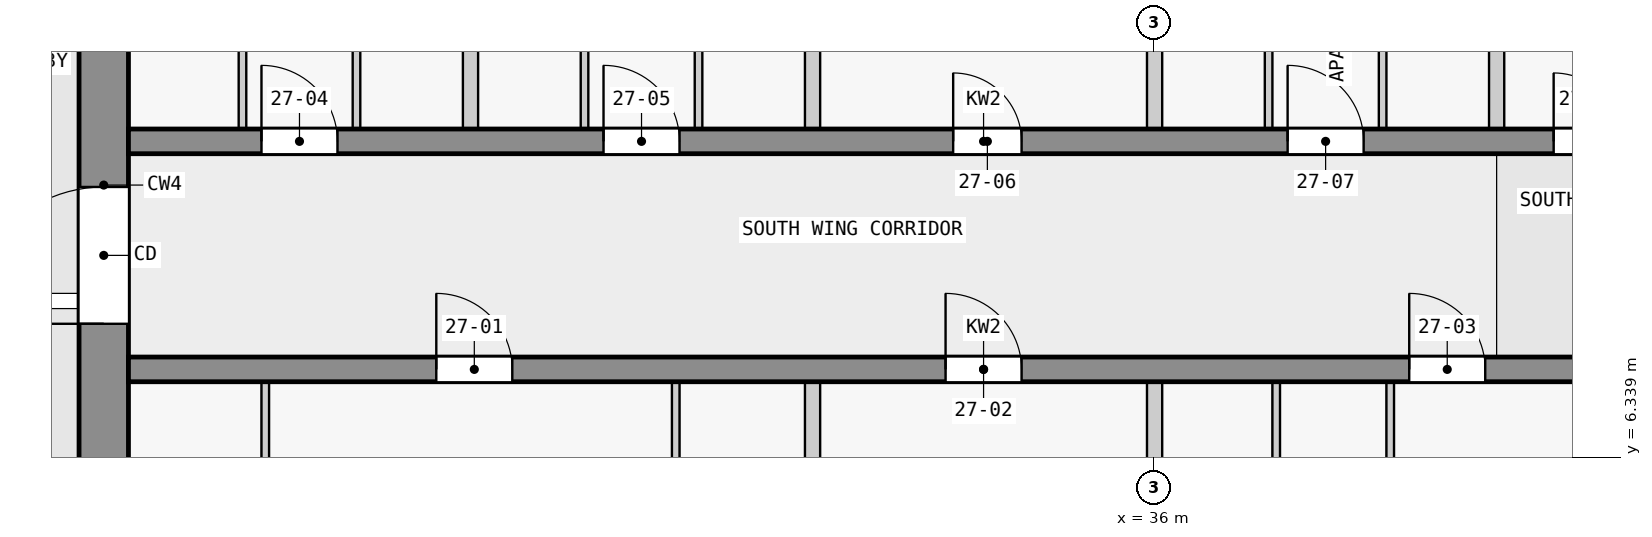
"""IFC4 building model, lengths in metres.
Left out: names, types, materials, properties, quantities, classifications, styles, units other than length and angle.
Written with IfcOpenShell. Run it as: python <this file> out.ifc"""

import sys

from ifc_helpers import new_model, si_unit, direction, frame, frame_2d, origin, place, context, subcontext, project, spatial, rectangle, extrude, element, fill, save


model = new_model("IFC4")
c1 = context("Model", 3, precision=1e-05, world=origin(), true_north=direction((0.0, 1.0)))
c2 = subcontext(c1, "Body", "Model", "MODEL_VIEW")
j1 = project(units=[si_unit("LENGTHUNIT", "METRE"), si_unit("PLANEANGLEUNIT", "RADIAN")], contexts=[c1])
p1 = place(None, origin())
s1 = spatial("IfcSite", under=j1, at=p1, CompositionType="ELEMENT")
p2 = place(p1, origin())
s2 = spatial("IfcBuilding", under=s1, at=p2, CompositionType="ELEMENT")
p3 = place(p2, frame((0.0, 0.0, 106.3)))
s3 = spatial("IfcBuildingStorey", under=s2, at=p3, CompositionType="ELEMENT", Elevation=106.3)
p4 = place(p3, frame((22.175, 2.5, 0.0), z_axis=(0.0, 0.0, 1.0), x_axis=(0.0, 1.0, 0.0)))
e1 = element("IfcWall", 1, at=p4, inside=s3, PredefinedType="SHEAR", context=c2, shape_type="SweptSolid", body=[
    extrude(rectangle(XDim=14.85, YDim=0.65, at=frame_2d((7.425, 0.0))), origin(), (0.0, 0.0, 1.0), 3.25),
])
p5 = place(p4, frame((5.6, 0.0, 0.0)))
e2 = element("IfcOpeningElement", 2, at=p5, cuts=e1, PredefinedType="OPENING", context=c2, shape_type="SweptSolid", body=[
    extrude(rectangle(XDim=1.8, YDim=2.1, at=frame_2d((0.9, 1.05))), frame((0.0, 0.335, 0.0), z_axis=(0.0, -1.0, 0.0), x_axis=(1.0, 0.0, 0.0)), (0.0, 0.0, 1.0), 0.67),
])
p6 = place(p3, frame((22.5, 7.5, 0.0), z_axis=(0.0, 0.0, 1.0), x_axis=(1.0, 0.0, 0.0)))
e3 = element("IfcWall", 3, at=p6, inside=s3, PredefinedType="SHEAR", context=c2, shape_type="SweptSolid", body=[
    extrude(rectangle(XDim=22.5, YDim=0.325, at=frame_2d((11.25, 0.0))), origin(), (0.0, 0.0, 1.0), 3.25),
])
p7 = place(p6, frame((4.05, 0.0, 0.0)))
e4 = element("IfcOpeningElement", 4, at=p7, cuts=e3, PredefinedType="OPENING", context=c2, shape_type="SweptSolid", body=[
    extrude(rectangle(XDim=1.0, YDim=2.1, at=frame_2d((0.5, 1.05))), frame((0.0, 0.172, 0.0), z_axis=(0.0, -1.0, 0.0), x_axis=(1.0, 0.0, 0.0)), (0.0, 0.0, 1.0), 0.345),
])
p8 = place(p6, frame((10.75, 0.0, 0.0)))
e5 = element("IfcOpeningElement", 5, at=p8, cuts=e3, PredefinedType="OPENING", context=c2, shape_type="SweptSolid", body=[
    extrude(rectangle(XDim=1.0, YDim=2.1, at=frame_2d((0.5, 1.05))), frame((0.0, 0.172, 0.0), z_axis=(0.0, -1.0, 0.0), x_axis=(1.0, 0.0, 0.0)), (0.0, 0.0, 1.0), 0.345),
])
p9 = place(p6, frame((16.85, 0.0, 0.0)))
e6 = element("IfcOpeningElement", 6, at=p9, cuts=e3, PredefinedType="OPENING", context=c2, shape_type="SweptSolid", body=[
    extrude(rectangle(XDim=1.0, YDim=2.1, at=frame_2d((0.5, 1.05))), frame((0.0, 0.172, 0.0), z_axis=(0.0, -1.0, 0.0), x_axis=(1.0, 0.0, 0.0)), (0.0, 0.0, 1.0), 0.345),
])
p10 = place(p3, frame((22.5, 10.5, 0.0), z_axis=(0.0, 0.0, 1.0), x_axis=(1.0, 0.0, 0.0)))
e7 = element("IfcWall", 7, at=p10, inside=s3, PredefinedType="SHEAR", context=c2, shape_type="SweptSolid", body=[
    extrude(rectangle(XDim=22.5, YDim=0.325, at=frame_2d((11.25, 0.0))), origin(), (0.0, 0.0, 1.0), 3.25),
])
p11 = place(p10, frame((1.75, 0.0, 0.0)))
e8 = element("IfcOpeningElement", 8, at=p11, cuts=e7, PredefinedType="OPENING", context=c2, shape_type="SweptSolid", body=[
    extrude(rectangle(XDim=1.0, YDim=2.1, at=frame_2d((0.5, 1.05))), frame((0.0, 0.172, 0.0), z_axis=(0.0, -1.0, 0.0), x_axis=(1.0, 0.0, 0.0)), (0.0, 0.0, 1.0), 0.345),
])
p12 = place(p10, frame((6.25, 0.0, 0.0)))
e9 = element("IfcOpeningElement", 9, at=p12, cuts=e7, PredefinedType="OPENING", context=c2, shape_type="SweptSolid", body=[
    extrude(rectangle(XDim=1.0, YDim=2.1, at=frame_2d((0.5, 1.05))), frame((0.0, 0.172, 0.0), z_axis=(0.0, -1.0, 0.0), x_axis=(1.0, 0.0, 0.0)), (0.0, 0.0, 1.0), 0.345),
])
p13 = place(p10, frame((10.85, 0.0, 0.0)))
e10 = element("IfcOpeningElement", 10, at=p13, cuts=e7, PredefinedType="OPENING", context=c2, shape_type="SweptSolid", body=[
    extrude(rectangle(XDim=0.9, YDim=2.1, at=frame_2d((0.45, 1.05))), frame((0.0, 0.172, 0.0), z_axis=(0.0, -1.0, 0.0), x_axis=(1.0, 0.0, 0.0)), (0.0, 0.0, 1.0), 0.345),
])
p14 = place(p10, frame((15.25, 0.0, 0.0)))
e11 = element("IfcOpeningElement", 11, at=p14, cuts=e7, PredefinedType="OPENING", context=c2, shape_type="SweptSolid", body=[
    extrude(rectangle(XDim=1.0, YDim=2.1, at=frame_2d((0.5, 1.05))), frame((0.0, 0.172, 0.0), z_axis=(0.0, -1.0, 0.0), x_axis=(1.0, 0.0, 0.0)), (0.0, 0.0, 1.0), 0.345),
])
p15 = place(p10, frame((18.75, 0.0, 0.0)))
e12 = element("IfcOpeningElement", 12, at=p15, cuts=e7, PredefinedType="OPENING", context=c2, shape_type="SweptSolid", body=[
    extrude(rectangle(XDim=0.9, YDim=2.1, at=frame_2d((0.45, 1.05))), frame((0.0, 0.172, 0.0), z_axis=(0.0, -1.0, 0.0), x_axis=(1.0, 0.0, 0.0)), (0.0, 0.0, 1.0), 0.345),
])
p16 = place(p10, frame((20.95, 0.0, 0.0)))
e13 = element("IfcOpeningElement", 13, at=p16, cuts=e7, PredefinedType="OPENING", context=c2, shape_type="SweptSolid", body=[
    extrude(rectangle(XDim=1.0, YDim=2.1, at=frame_2d((0.5, 1.05))), frame((0.0, 0.172, 0.0), z_axis=(0.0, -1.0, 0.0), x_axis=(1.0, 0.0, 0.0)), (0.0, 0.0, 1.0), 0.345),
])
p17 = place(p3, frame((24.0, 10.663, 0.0), z_axis=(0.0, 0.0, 1.0), x_axis=(0.0, 1.0, 0.0)))
e14 = element("IfcWall", 14, at=p17, inside=s3, PredefinedType="PARTITIONING", context=c2, shape_type="SweptSolid", body=[
    extrude(rectangle(XDim=3.4, YDim=0.1, at=frame_2d((1.7, 0.0))), origin(), (0.0, 0.0, 1.0), 3.25),
])
p18 = place(p17, frame((1.25, 0.0, 0.0)))
e15 = element("IfcOpeningElement", 15, at=p18, cuts=e14, PredefinedType="OPENING", context=c2, shape_type="SweptSolid", body=[
    extrude(rectangle(XDim=0.9, YDim=2.1, at=frame_2d((0.45, 1.05))), frame((0.0, 0.06, 0.0), z_axis=(0.0, -1.0, 0.0), x_axis=(1.0, 0.0, 0.0)), (0.0, 0.0, 1.0), 0.12),
])
p19 = place(p3, frame((24.3, 3.938, 0.0), z_axis=(0.0, 0.0, 1.0), x_axis=(0.0, 1.0, 0.0)))
e16 = element("IfcWall", 16, at=p19, inside=s3, PredefinedType="PARTITIONING", context=c2, shape_type="SweptSolid", body=[
    extrude(rectangle(XDim=3.4, YDim=0.1, at=frame_2d((1.7, 0.0))), origin(), (0.0, 0.0, 1.0), 3.25),
])
p20 = place(p19, frame((1.25, 0.0, 0.0)))
e17 = element("IfcOpeningElement", 17, at=p20, cuts=e16, PredefinedType="OPENING", context=c2, shape_type="SweptSolid", body=[
    extrude(rectangle(XDim=0.9, YDim=2.1, at=frame_2d((0.45, 1.05))), frame((0.0, 0.06, 0.0), z_axis=(0.0, -1.0, 0.0), x_axis=(1.0, 0.0, 0.0)), (0.0, 0.0, 1.0), 0.12),
])
p21 = place(p3, frame((25.5, 14.062, 0.0), z_axis=(0.0, 0.0, 1.0), x_axis=(0.0, -1.0, 0.0)))
e18 = element("IfcWall", 18, at=p21, inside=s3, PredefinedType="PARTITIONING", context=c2, shape_type="SweptSolid", body=[
    extrude(rectangle(XDim=3.4, YDim=0.1, at=frame_2d((1.7, 0.0))), origin(), (0.0, 0.0, 1.0), 3.25),
])
p22 = place(p21, frame((1.25, 0.0, 0.0)))
e19 = element("IfcOpeningElement", 19, at=p22, cuts=e18, PredefinedType="OPENING", context=c2, shape_type="SweptSolid", body=[
    extrude(rectangle(XDim=0.9, YDim=2.1, at=frame_2d((0.45, 1.05))), frame((0.0, 0.06, 0.0), z_axis=(0.0, -1.0, 0.0), x_axis=(1.0, 0.0, 0.0)), (0.0, 0.0, 1.0), 0.12),
])
p23 = place(p3, frame((27.0, 10.663, 0.0), z_axis=(0.0, 0.0, 1.0), x_axis=(0.0, 1.0, 0.0)))
e20 = element("IfcWall", 20, at=p23, inside=s3, PredefinedType="PARTITIONING", context=c2, shape_type="SweptSolid", body=[
    extrude(rectangle(XDim=3.4, YDim=0.2, at=frame_2d((1.7, 0.0))), origin(), (0.0, 0.0, 1.0), 3.25),
])
p24 = place(p3, frame((28.5, 10.663, 0.0), z_axis=(0.0, 0.0, 1.0), x_axis=(0.0, 1.0, 0.0)))
e21 = element("IfcWall", 21, at=p24, inside=s3, PredefinedType="PARTITIONING", context=c2, shape_type="SweptSolid", body=[
    extrude(rectangle(XDim=3.4, YDim=0.1, at=frame_2d((1.7, 0.0))), origin(), (0.0, 0.0, 1.0), 3.25),
])
p25 = place(p24, frame((1.25, 0.0, 0.0)))
e22 = element("IfcOpeningElement", 22, at=p25, cuts=e21, PredefinedType="OPENING", context=c2, shape_type="SweptSolid", body=[
    extrude(rectangle(XDim=0.9, YDim=2.1, at=frame_2d((0.45, 1.05))), frame((0.0, 0.06, 0.0), z_axis=(0.0, -1.0, 0.0), x_axis=(1.0, 0.0, 0.0)), (0.0, 0.0, 1.0), 0.12),
])
p26 = place(p3, frame((29.7, 7.337, 0.0), z_axis=(0.0, 0.0, 1.0), x_axis=(0.0, -1.0, 0.0)))
e23 = element("IfcWall", 23, at=p26, inside=s3, PredefinedType="PARTITIONING", context=c2, shape_type="SweptSolid", body=[
    extrude(rectangle(XDim=3.4, YDim=0.1, at=frame_2d((1.7, 0.0))), origin(), (0.0, 0.0, 1.0), 3.25),
])
p27 = place(p26, frame((1.25, 0.0, 0.0)))
e24 = element("IfcOpeningElement", 24, at=p27, cuts=e23, PredefinedType="OPENING", context=c2, shape_type="SweptSolid", body=[
    extrude(rectangle(XDim=0.9, YDim=2.1, at=frame_2d((0.45, 1.05))), frame((0.0, 0.06, 0.0), z_axis=(0.0, -1.0, 0.0), x_axis=(1.0, 0.0, 0.0)), (0.0, 0.0, 1.0), 0.12),
])
p28 = place(p3, frame((30.0, 14.062, 0.0), z_axis=(0.0, 0.0, 1.0), x_axis=(0.0, -1.0, 0.0)))
e25 = element("IfcWall", 25, at=p28, inside=s3, PredefinedType="PARTITIONING", context=c2, shape_type="SweptSolid", body=[
    extrude(rectangle(XDim=3.4, YDim=0.1, at=frame_2d((1.7, 0.0))), origin(), (0.0, 0.0, 1.0), 3.25),
])
p29 = place(p28, frame((1.25, 0.0, 0.0)))
e26 = element("IfcOpeningElement", 26, at=p29, cuts=e25, PredefinedType="OPENING", context=c2, shape_type="SweptSolid", body=[
    extrude(rectangle(XDim=0.9, YDim=2.1, at=frame_2d((0.45, 1.05))), frame((0.0, 0.06, 0.0), z_axis=(0.0, -1.0, 0.0), x_axis=(1.0, 0.0, 0.0)), (0.0, 0.0, 1.0), 0.12),
])
p30 = place(p3, frame((31.5, 1.122, 0.0), z_axis=(0.0, 0.0, 1.0), x_axis=(0.0, 1.0, 0.0)))
e27 = element("IfcWall", 27, at=p30, inside=s3, PredefinedType="PARTITIONING", context=c2, shape_type="SweptSolid", body=[
    extrude(rectangle(XDim=6.215, YDim=0.2, at=frame_2d((3.107, 0.0))), origin(), (0.0, 0.0, 1.0), 3.25),
])
p31 = place(p3, frame((31.5, 10.663, 0.0), z_axis=(0.0, 0.0, 1.0), x_axis=(0.0, 1.0, 0.0)))
e28 = element("IfcWall", 28, at=p31, inside=s3, PredefinedType="PARTITIONING", context=c2, shape_type="SweptSolid", body=[
    extrude(rectangle(XDim=3.4, YDim=0.2, at=frame_2d((1.7, 0.0))), origin(), (0.0, 0.0, 1.0), 3.25),
])
for number, where, z_axis, x_axis in (
    (29, (36.0, 1.4, 0.0), (0.0, 0.0, 1.0), (0.0, 1.0, 0.0)),
    (30, (36.0, 10.663, 0.0), (0.0, 0.0, 1.0), (0.0, 1.0, 0.0)),
):
    element("IfcWall", number, at=place(p3, frame(where, z_axis=z_axis, x_axis=x_axis)), inside=s3, PredefinedType="PARTITIONING", context=c2, shape_type="SweptSolid", body=[
        extrude(rectangle(XDim=5.938, YDim=0.2, at=frame_2d((2.969, 0.0))), origin(), (0.0, 0.0, 1.0), 3.25),
    ])
p32 = place(p3, frame((37.5, 10.663, 0.0), z_axis=(0.0, 0.0, 1.0), x_axis=(0.0, 1.0, 0.0)))
e31 = element("IfcWall", 31, at=p32, inside=s3, PredefinedType="PARTITIONING", context=c2, shape_type="SweptSolid", body=[
    extrude(rectangle(XDim=3.4, YDim=0.1, at=frame_2d((1.7, 0.0))), origin(), (0.0, 0.0, 1.0), 3.25),
])
p33 = place(p32, frame((1.25, 0.0, 0.0)))
e32 = element("IfcOpeningElement", 32, at=p33, cuts=e31, PredefinedType="OPENING", context=c2, shape_type="SweptSolid", body=[
    extrude(rectangle(XDim=0.9, YDim=2.1, at=frame_2d((0.45, 1.05))), frame((0.0, 0.06, 0.0), z_axis=(0.0, -1.0, 0.0), x_axis=(1.0, 0.0, 0.0)), (0.0, 0.0, 1.0), 0.12),
])
p34 = place(p3, frame((37.6, 3.938, 0.0), z_axis=(0.0, 0.0, 1.0), x_axis=(0.0, 1.0, 0.0)))
e33 = element("IfcWall", 33, at=p34, inside=s3, PredefinedType="PARTITIONING", context=c2, shape_type="SweptSolid", body=[
    extrude(rectangle(XDim=3.4, YDim=0.1, at=frame_2d((1.7, 0.0))), origin(), (0.0, 0.0, 1.0), 3.25),
])
p35 = place(p3, frame((39.0, 14.062, 0.0), z_axis=(0.0, 0.0, 1.0), x_axis=(0.0, -1.0, 0.0)))
e34 = element("IfcWall", 34, at=p35, inside=s3, PredefinedType="PARTITIONING", context=c2, shape_type="SweptSolid", body=[
    extrude(rectangle(XDim=3.4, YDim=0.1, at=frame_2d((1.7, 0.0))), origin(), (0.0, 0.0, 1.0), 3.25),
])
p36 = place(p35, frame((1.25, 0.0, 0.0)))
e35 = element("IfcOpeningElement", 35, at=p36, cuts=e34, PredefinedType="OPENING", context=c2, shape_type="SweptSolid", body=[
    extrude(rectangle(XDim=0.9, YDim=2.1, at=frame_2d((0.45, 1.05))), frame((0.0, 0.06, 0.0), z_axis=(0.0, -1.0, 0.0), x_axis=(1.0, 0.0, 0.0)), (0.0, 0.0, 1.0), 0.12),
])
p37 = place(p3, frame((39.1, 3.938, 0.0), z_axis=(0.0, 0.0, 1.0), x_axis=(0.0, 1.0, 0.0)))
e36 = element("IfcWall", 36, at=p37, inside=s3, PredefinedType="PARTITIONING", context=c2, shape_type="SweptSolid", body=[
    extrude(rectangle(XDim=3.4, YDim=0.1, at=frame_2d((1.7, 0.0))), origin(), (0.0, 0.0, 1.0), 3.25),
])
p38 = place(p37, frame((1.25, 0.0, 0.0)))
e37 = element("IfcOpeningElement", 37, at=p38, cuts=e36, PredefinedType="OPENING", context=c2, shape_type="SweptSolid", body=[
    extrude(rectangle(XDim=0.9, YDim=2.1, at=frame_2d((0.45, 1.05))), frame((0.0, 0.06, 0.0), z_axis=(0.0, -1.0, 0.0), x_axis=(1.0, 0.0, 0.0)), (0.0, 0.0, 1.0), 0.12),
])
p39 = place(p3, frame((40.5, 10.663, 0.0), z_axis=(0.0, 0.0, 1.0), x_axis=(0.0, 1.0, 0.0)))
e38 = element("IfcWall", 38, at=p39, inside=s3, PredefinedType="PARTITIONING", context=c2, shape_type="SweptSolid", body=[
    extrude(rectangle(XDim=3.4, YDim=0.2, at=frame_2d((1.7, 0.0))), origin(), (0.0, 0.0, 1.0), 3.25),
])
p40 = place(p5, origin())
e39 = element("IfcDoor", 39, at=p40, inside=s3, OperationType="DOUBLE_DOOR_SINGLE_SWING", PredefinedType="DOOR", context=c2, shape_type="SweptSolid", body=[
    extrude(rectangle(XDim=1.8, YDim=2.1, at=frame_2d((0.9, 1.05))), frame((0.0, 0.025, 0.0), z_axis=(0.0, -1.0, 0.0), x_axis=(1.0, 0.0, 0.0)), (0.0, 0.0, 1.0), 0.05),
])
fill(e2, e39)
p41 = place(p7, origin())
e40 = element("IfcDoor", 40, at=p41, inside=s3, OperationType="SINGLE_SWING_LEFT", PredefinedType="DOOR", context=c2, shape_type="SweptSolid", body=[
    extrude(rectangle(XDim=1.0, YDim=2.1, at=frame_2d((0.5, 1.05))), frame((0.0, 0.025, 0.0), z_axis=(0.0, -1.0, 0.0), x_axis=(1.0, 0.0, 0.0)), (0.0, 0.0, 1.0), 0.05),
])
fill(e4, e40)
p42 = place(p8, origin())
e41 = element("IfcDoor", 41, at=p42, inside=s3, OperationType="SINGLE_SWING_LEFT", PredefinedType="DOOR", context=c2, shape_type="SweptSolid", body=[
    extrude(rectangle(XDim=1.0, YDim=2.1, at=frame_2d((0.5, 1.05))), frame((0.0, 0.025, 0.0), z_axis=(0.0, -1.0, 0.0), x_axis=(1.0, 0.0, 0.0)), (0.0, 0.0, 1.0), 0.05),
])
fill(e5, e41)
p43 = place(p9, origin())
e42 = element("IfcDoor", 42, at=p43, inside=s3, OperationType="SINGLE_SWING_RIGHT", PredefinedType="DOOR", context=c2, shape_type="SweptSolid", body=[
    extrude(rectangle(XDim=1.0, YDim=2.1, at=frame_2d((0.5, 1.05))), frame((0.0, 0.025, 0.0), z_axis=(0.0, -1.0, 0.0), x_axis=(1.0, 0.0, 0.0)), (0.0, 0.0, 1.0), 0.05),
])
fill(e6, e42)
p44 = place(p11, origin())
e43 = element("IfcDoor", 43, at=p44, inside=s3, OperationType="SINGLE_SWING_LEFT", PredefinedType="DOOR", context=c2, shape_type="SweptSolid", body=[
    extrude(rectangle(XDim=1.0, YDim=2.1, at=frame_2d((0.5, 1.05))), frame((0.0, 0.025, 0.0), z_axis=(0.0, -1.0, 0.0), x_axis=(1.0, 0.0, 0.0)), (0.0, 0.0, 1.0), 0.05),
])
fill(e8, e43)
p45 = place(p12, origin())
e44 = element("IfcDoor", 44, at=p45, inside=s3, OperationType="SINGLE_SWING_LEFT", PredefinedType="DOOR", context=c2, shape_type="SweptSolid", body=[
    extrude(rectangle(XDim=1.0, YDim=2.1, at=frame_2d((0.5, 1.05))), frame((0.0, 0.025, 0.0), z_axis=(0.0, -1.0, 0.0), x_axis=(1.0, 0.0, 0.0)), (0.0, 0.0, 1.0), 0.05),
])
fill(e9, e44)
p46 = place(p13, origin())
e45 = element("IfcDoor", 45, at=p46, inside=s3, OperationType="SINGLE_SWING_RIGHT", PredefinedType="DOOR", context=c2, shape_type="SweptSolid", body=[
    extrude(rectangle(XDim=0.9, YDim=2.1, at=frame_2d((0.45, 1.05))), frame((0.0, 0.025, 0.0), z_axis=(0.0, -1.0, 0.0), x_axis=(1.0, 0.0, 0.0)), (0.0, 0.0, 1.0), 0.05),
])
fill(e10, e45)
p47 = place(p14, origin())
e46 = element("IfcDoor", 46, at=p47, inside=s3, OperationType="SINGLE_SWING_RIGHT", PredefinedType="DOOR", context=c2, shape_type="SweptSolid", body=[
    extrude(rectangle(XDim=1.0, YDim=2.1, at=frame_2d((0.5, 1.05))), frame((0.0, 0.025, 0.0), z_axis=(0.0, -1.0, 0.0), x_axis=(1.0, 0.0, 0.0)), (0.0, 0.0, 1.0), 0.05),
])
fill(e11, e46)
p48 = place(p15, origin())
e47 = element("IfcDoor", 47, at=p48, inside=s3, OperationType="SINGLE_SWING_RIGHT", PredefinedType="DOOR", context=c2, shape_type="SweptSolid", body=[
    extrude(rectangle(XDim=0.9, YDim=2.1, at=frame_2d((0.45, 1.05))), frame((0.0, 0.025, 0.0), z_axis=(0.0, -1.0, 0.0), x_axis=(1.0, 0.0, 0.0)), (0.0, 0.0, 1.0), 0.05),
])
fill(e12, e47)
save(model, sys.argv[1])
